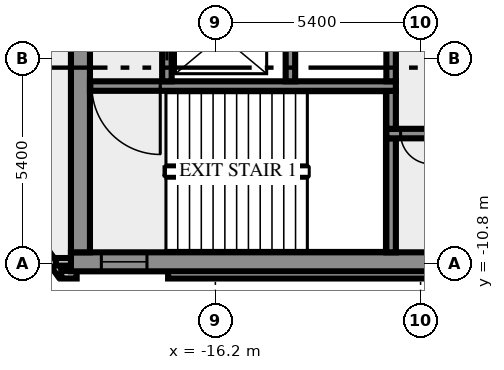
"""IFC4 building model, lengths in metres.
Left out: names, types, materials, properties, quantities, classifications, styles, units other than length and angle.
Written with IfcOpenShell. Run it as: python <this file> out.ifc"""

import sys

from ifc_helpers import new_model, si_unit, direction, frame, frame_2d, origin, place, context, subcontext, project, spatial, rectangle, extrude, element, fill, save


model = new_model("IFC4")
c1 = context("Model", 3, precision=1e-05, world=origin(), true_north=direction((0.0, 1.0)))
c2 = subcontext(c1, "Body", "Model", "MODEL_VIEW")
j1 = project(units=[si_unit("LENGTHUNIT", "METRE"), si_unit("PLANEANGLEUNIT", "RADIAN")], contexts=[c1])
p1 = place(None, origin())
s1 = spatial("IfcSite", under=j1, at=p1, CompositionType="ELEMENT")
p2 = place(p1, origin())
s2 = spatial("IfcBuilding", under=s1, at=p2, CompositionType="ELEMENT")
p3 = place(p2, frame((0.0, 0.0, 339.0)))
s3 = spatial("IfcBuildingStorey", under=s2, at=p3, CompositionType="ELEMENT", Elevation=339.0)
p4 = place(p3, frame((-21.833, -8.909, 0.0), z_axis=(0.0, 0.0, 1.0), x_axis=(0.587766567315, -0.809030569476, 0.0)))
e1 = element("IfcWall", 1, at=p4, inside=s3, PredefinedType="SOLIDWALL", context=c2, shape_type="SweptSolid", body=[
    extrude(rectangle(XDim=2.688, YDim=0.2, at=frame_2d((1.344, 0.0))), origin(), (0.0, 0.0, 1.0), 3.65),
])
p5 = place(p3, frame((-20.256, -11.088, 0.0), z_axis=(0.0, 0.0, 1.0), x_axis=(1.0, 0.0, 0.0)))
e2 = element("IfcWall", 2, at=p5, inside=s3, PredefinedType="SOLIDWALL", context=c2, shape_type="SweptSolid", body=[
    extrude(rectangle(XDim=0.406, YDim=0.2, at=frame_2d((0.203, 0.0))), origin(), (0.0, 0.0, 1.0), 3.65),
])
p6 = place(p3, frame((-17.444, -11.088, 0.0), z_axis=(0.0, 0.0, 1.0), x_axis=(1.0, 0.0, 0.0)))
e3 = element("IfcWall", 3, at=p6, inside=s3, PredefinedType="SOLIDWALL", context=c2, shape_type="SweptSolid", body=[
    extrude(rectangle(XDim=34.888, YDim=0.2, at=frame_2d((17.444, 0.0))), origin(), (0.0, 0.0, 1.0), 3.65),
])
p7 = place(p3, frame((-19.98, -10.75, 0.0), z_axis=(0.0, 0.0, 1.0), x_axis=(-1.0, 0.0, 0.0)))
e4 = element("IfcWall", 4, at=p7, inside=s3, PredefinedType="SOLIDWALL", context=c2, shape_type="SweptSolid", body=[
    extrude(rectangle(XDim=0.417, YDim=0.2, at=frame_2d((0.208, 0.0))), origin(), (0.0, 0.0, 1.0), 3.65),
])
p8 = place(p3, frame((-20.0, -10.75, 0.0), z_axis=(0.0, 0.0, 1.0), x_axis=(1.0, 0.0, 0.0)))
e5 = element("IfcWall", 5, at=p8, inside=s3, PredefinedType="SHEAR", context=c2, shape_type="SweptSolid", body=[
    extrude(rectangle(XDim=40.0, YDim=0.5, at=frame_2d((20.0, 0.0))), origin(), (0.0, 0.0, 1.0), 3.65),
])
p9 = place(p8, frame((0.8, 0.0, 1.0)))
e6 = element("IfcOpeningElement", 6, at=p9, cuts=e5, PredefinedType="OPENING", context=c2, shape_type="SweptSolid", body=[
    extrude(rectangle(XDim=1.2, YDim=1.2, at=frame_2d((0.6, 0.6))), frame((0.0, 0.26, 0.0), z_axis=(0.0, -1.0, 0.0), x_axis=(1.0, 0.0, 0.0)), (0.0, 0.0, 1.0), 0.52),
])
p10 = place(p8, frame((38.0, 0.0, 1.0)))
e7 = element("IfcOpeningElement", 7, at=p10, cuts=e5, PredefinedType="OPENING", context=c2, shape_type="SweptSolid", body=[
    extrude(rectangle(XDim=1.2, YDim=1.2, at=frame_2d((0.6, 0.6))), frame((0.0, 0.26, 0.0), z_axis=(0.0, -1.0, 0.0), x_axis=(1.0, 0.0, 0.0)), (0.0, 0.0, 1.0), 0.52),
])
p11 = place(p3, frame((-19.75, -10.5, 0.0), z_axis=(0.0, 0.0, 1.0), x_axis=(0.0, 1.0, 0.0)))
e8 = element("IfcWall", 8, at=p11, inside=s3, PredefinedType="SHEAR", context=c2, shape_type="SweptSolid", body=[
    extrude(rectangle(XDim=8.8, YDim=0.5, at=frame_2d((4.4, 0.0))), origin(), (0.0, 0.0, 1.0), 3.65),
])
p12 = place(p3, frame((-11.575, -10.5, 0.0), z_axis=(0.0, 0.0, 1.0), x_axis=(0.0, 1.0, 0.0)))
e9 = element("IfcWall", 9, at=p12, inside=s3, PredefinedType="SHEAR", context=c2, shape_type="SweptSolid", body=[
    extrude(rectangle(XDim=3.0, YDim=0.25, at=frame_2d((1.5, 0.0))), origin(), (0.0, 0.0, 1.0), 3.65),
])
p13 = place(p3, frame((11.7, -7.375, 0.0), z_axis=(0.0, 0.0, 1.0), x_axis=(-1.0, 0.0, 0.0)))
e10 = element("IfcWall", 10, at=p13, inside=s3, PredefinedType="SHEAR", context=c2, shape_type="SweptSolid", body=[
    extrude(rectangle(XDim=23.4, YDim=0.25, at=frame_2d((11.7, 0.0))), origin(), (0.0, 0.0, 1.0), 3.65),
])
p14 = place(p13, frame((22.225, 0.0, 0.0)))
e11 = element("IfcOpeningElement", 11, at=p14, cuts=e10, PredefinedType="OPENING", context=c2, shape_type="SweptSolid", body=[
    extrude(rectangle(XDim=0.8, YDim=2.1, at=frame_2d((0.4, 1.05))), frame((0.0, 0.135, 0.0), z_axis=(0.0, -1.0, 0.0), x_axis=(1.0, 0.0, 0.0)), (0.0, 0.0, 1.0), 0.27),
])
p15 = place(p13, frame((20.2, 0.0, 0.0)))
e12 = element("IfcOpeningElement", 12, at=p15, cuts=e10, PredefinedType="OPENING", context=c2, shape_type="SweptSolid", body=[
    extrude(rectangle(XDim=1.1, YDim=2.1, at=frame_2d((0.55, 1.05))), frame((0.0, 0.135, 0.0), z_axis=(0.0, -1.0, 0.0), x_axis=(1.0, 0.0, 0.0)), (0.0, 0.0, 1.0), 0.27),
])
p16 = place(p13, frame((17.7, 0.0, 0.0)))
e13 = element("IfcOpeningElement", 13, at=p16, cuts=e10, PredefinedType="OPENING", context=c2, shape_type="SweptSolid", body=[
    extrude(rectangle(XDim=1.1, YDim=2.1, at=frame_2d((0.55, 1.05))), frame((0.0, 0.135, 0.0), z_axis=(0.0, -1.0, 0.0), x_axis=(1.0, 0.0, 0.0)), (0.0, 0.0, 1.0), 0.27),
])
p17 = place(p13, frame((15.975, 0.0, 0.0)))
e14 = element("IfcOpeningElement", 14, at=p17, cuts=e10, PredefinedType="OPENING", context=c2, shape_type="SweptSolid", body=[
    extrude(rectangle(XDim=0.8, YDim=2.1, at=frame_2d((0.4, 1.05))), frame((0.0, 0.135, 0.0), z_axis=(0.0, -1.0, 0.0), x_axis=(1.0, 0.0, 0.0)), (0.0, 0.0, 1.0), 0.27),
])
p18 = place(p13, frame((14.2, 0.0, 0.0)))
e15 = element("IfcOpeningElement", 15, at=p18, cuts=e10, PredefinedType="OPENING", context=c2, shape_type="SweptSolid", body=[
    extrude(rectangle(XDim=0.9, YDim=2.1, at=frame_2d((0.45, 1.05))), frame((0.0, 0.135, 0.0), z_axis=(0.0, -1.0, 0.0), x_axis=(1.0, 0.0, 0.0)), (0.0, 0.0, 1.0), 0.27),
])
p19 = place(p13, frame((12.35, 0.0, 0.0)))
e16 = element("IfcOpeningElement", 16, at=p19, cuts=e10, PredefinedType="OPENING", context=c2, shape_type="SweptSolid", body=[
    extrude(rectangle(XDim=0.9, YDim=2.1, at=frame_2d((0.45, 1.05))), frame((0.0, 0.135, 0.0), z_axis=(0.0, -1.0, 0.0), x_axis=(1.0, 0.0, 0.0)), (0.0, 0.0, 1.0), 0.27),
])
p20 = place(p13, frame((10.65, 0.0, 0.0)))
e17 = element("IfcOpeningElement", 17, at=p20, cuts=e10, PredefinedType="OPENING", context=c2, shape_type="SweptSolid", body=[
    extrude(rectangle(XDim=0.9, YDim=2.1, at=frame_2d((0.45, 1.05))), frame((0.0, 0.135, 0.0), z_axis=(0.0, -1.0, 0.0), x_axis=(1.0, 0.0, 0.0)), (0.0, 0.0, 1.0), 0.27),
])
p21 = place(p13, frame((7.713, 0.0, 0.0)))
e18 = element("IfcOpeningElement", 18, at=p21, cuts=e10, PredefinedType="OPENING", context=c2, shape_type="SweptSolid", body=[
    extrude(rectangle(XDim=0.9, YDim=2.1, at=frame_2d((0.45, 1.05))), frame((0.0, 0.135, 0.0), z_axis=(0.0, -1.0, 0.0), x_axis=(1.0, 0.0, 0.0)), (0.0, 0.0, 1.0), 0.27),
])
p22 = place(p13, frame((4.15, 0.0, 0.0)))
e19 = element("IfcOpeningElement", 19, at=p22, cuts=e10, PredefinedType="OPENING", context=c2, shape_type="SweptSolid", body=[
    extrude(rectangle(XDim=0.9, YDim=2.1, at=frame_2d((0.45, 1.05))), frame((0.0, 0.135, 0.0), z_axis=(0.0, -1.0, 0.0), x_axis=(1.0, 0.0, 0.0)), (0.0, 0.0, 1.0), 0.27),
])
p23 = place(p13, frame((1.138, 0.0, 0.0)))
e20 = element("IfcOpeningElement", 20, at=p23, cuts=e10, PredefinedType="OPENING", context=c2, shape_type="SweptSolid", body=[
    extrude(rectangle(XDim=0.9, YDim=2.1, at=frame_2d((0.45, 1.05))), frame((0.0, 0.135, 0.0), z_axis=(0.0, -1.0, 0.0), x_axis=(1.0, 0.0, 0.0)), (0.0, 0.0, 1.0), 0.27),
])
p24 = place(p3, frame((-11.575, -7.25, 0.0), z_axis=(0.0, 0.0, 1.0), x_axis=(0.0, 1.0, 0.0)))
e21 = element("IfcWall", 21, at=p24, inside=s3, PredefinedType="SHEAR", context=c2, shape_type="SweptSolid", body=[
    extrude(rectangle(XDim=1.0, YDim=0.25, at=frame_2d((0.5, 0.0))), origin(), (0.0, 0.0, 1.0), 3.65),
])
p25 = place(p3, frame((-11.45, -6.125, 0.0), z_axis=(0.0, 0.0, 1.0), x_axis=(-1.0, 0.0, 0.0)))
e22 = element("IfcWall", 22, at=p25, inside=s3, PredefinedType="SHEAR", context=c2, shape_type="SweptSolid", body=[
    extrude(rectangle(XDim=8.05, YDim=0.25, at=frame_2d((4.025, 0.0))), origin(), (0.0, 0.0, 1.0), 3.65),
])
p26 = place(p25, frame((6.2, 0.0, 0.0)))
e23 = element("IfcOpeningElement", 23, at=p26, cuts=e22, PredefinedType="OPENING", context=c2, shape_type="SweptSolid", body=[
    extrude(rectangle(XDim=1.8, YDim=2.1, at=frame_2d((0.9, 1.05))), frame((0.0, 0.135, 0.0), z_axis=(0.0, -1.0, 0.0), x_axis=(1.0, 0.0, 0.0)), (0.0, 0.0, 1.0), 0.27),
])
p27 = place(p3, frame((-17.475, -6.0, 0.0), z_axis=(0.0, 0.0, 1.0), x_axis=(0.0, 1.0, 0.0)))
e24 = element("IfcWall", 24, at=p27, inside=s3, PredefinedType="SHEAR", context=c2, shape_type="SweptSolid", body=[
    extrude(rectangle(XDim=4.3, YDim=0.25, at=frame_2d((2.15, 0.0))), origin(), (0.0, 0.0, 1.0), 3.65),
])
p28 = place(p27, frame((0.55, 0.0, 0.0)))
e25 = element("IfcOpeningElement", 25, at=p28, cuts=e24, PredefinedType="OPENING", context=c2, shape_type="SweptSolid", body=[
    extrude(rectangle(XDim=1.3, YDim=2.1, at=frame_2d((0.65, 1.05))), frame((0.0, 0.135, 0.0), z_axis=(0.0, -1.0, 0.0), x_axis=(1.0, 0.0, 0.0)), (0.0, 0.0, 1.0), 0.27),
])
p29 = place(p3, frame((-14.225, -6.0, 0.0), z_axis=(0.0, 0.0, 1.0), x_axis=(0.0, 1.0, 0.0)))
e26 = element("IfcWall", 26, at=p29, inside=s3, PredefinedType="SHEAR", context=c2, shape_type="SweptSolid", body=[
    extrude(rectangle(XDim=4.3, YDim=0.25, at=frame_2d((2.15, 0.0))), origin(), (0.0, 0.0, 1.0), 3.65),
])
p30 = place(p3, frame((-11.575, -6.0, 0.0), z_axis=(0.0, 0.0, 1.0), x_axis=(0.0, 1.0, 0.0)))
e27 = element("IfcWall", 27, at=p30, inside=s3, PredefinedType="SHEAR", context=c2, shape_type="SweptSolid", body=[
    extrude(rectangle(XDim=1.75, YDim=0.25, at=frame_2d((0.875, 0.0))), origin(), (0.0, 0.0, 1.0), 3.65),
])
p31 = place(p9, origin())
e28 = element("IfcWindow", 28, at=p31, inside=s3, PartitioningType="SINGLE_PANEL", PredefinedType="WINDOW", context=c2, shape_type="SweptSolid", body=[
    extrude(rectangle(XDim=1.2, YDim=1.2, at=frame_2d((0.6, 0.6))), frame((0.0, 0.03, 0.0), z_axis=(0.0, -1.0, 0.0), x_axis=(1.0, 0.0, 0.0)), (0.0, 0.0, 1.0), 0.06),
])
fill(e6, e28)
p32 = place(p14, origin())
e29 = element("IfcDoor", 29, at=p32, inside=s3, OperationType="SINGLE_SWING_RIGHT", PredefinedType="DOOR", context=c2, shape_type="SweptSolid", body=[
    extrude(rectangle(XDim=0.8, YDim=2.1, at=frame_2d((0.4, 1.05))), frame((0.0, 0.025, 0.0), z_axis=(0.0, -1.0, 0.0), x_axis=(1.0, 0.0, 0.0)), (0.0, 0.0, 1.0), 0.05),
])
fill(e11, e29)
p33 = place(p26, origin())
e30 = element("IfcDoor", 30, at=p33, inside=s3, OperationType="DOUBLE_DOOR_SINGLE_SWING", PredefinedType="DOOR", context=c2, shape_type="SweptSolid", body=[
    extrude(rectangle(XDim=1.8, YDim=2.1, at=frame_2d((0.9, 1.05))), frame((0.0, 0.025, 0.0), z_axis=(0.0, -1.0, 0.0), x_axis=(1.0, 0.0, 0.0)), (0.0, 0.0, 1.0), 0.05),
])
fill(e23, e30)
p34 = place(p28, origin())
e31 = element("IfcDoor", 31, at=p34, inside=s3, OperationType="DOUBLE_DOOR_SLIDING", PredefinedType="DOOR", context=c2, shape_type="SweptSolid", body=[
    extrude(rectangle(XDim=1.3, YDim=2.1, at=frame_2d((0.65, 1.05))), frame((0.0, 0.025, 0.0), z_axis=(0.0, -1.0, 0.0), x_axis=(1.0, 0.0, 0.0)), (0.0, 0.0, 1.0), 0.05),
])
fill(e25, e31)
save(model, sys.argv[1])
